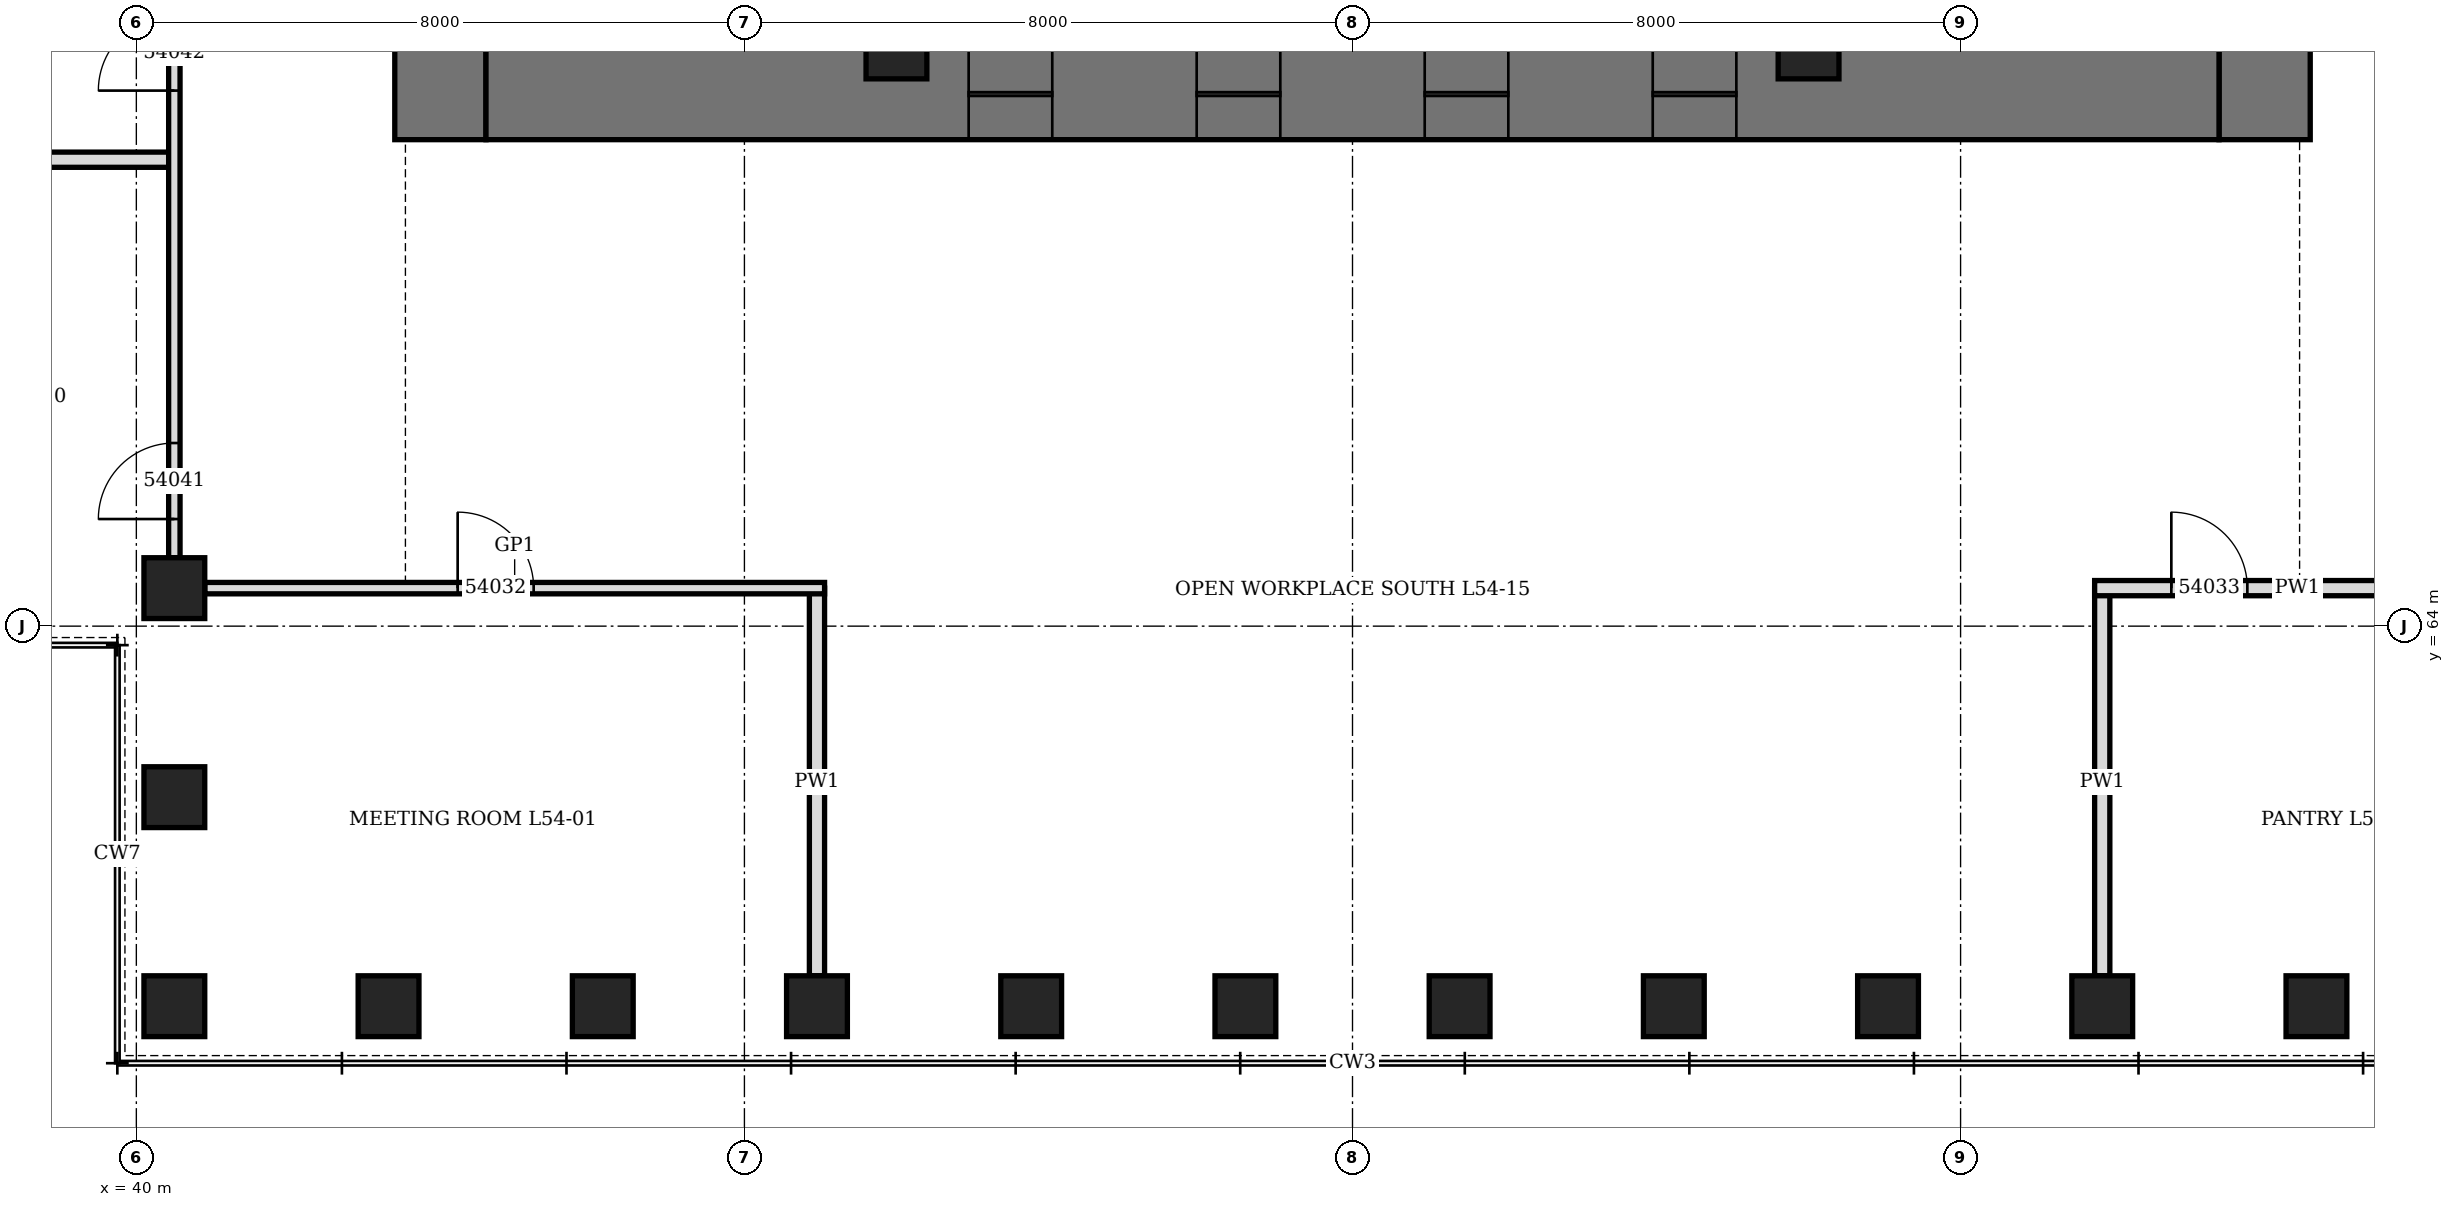
"""IFC4 building model, lengths in metres.
Left out: names, types, materials, properties, quantities, classifications, styles, units other than length and angle.
Written with IfcOpenShell. Run it as: python <this file> out.ifc"""

import sys

from ifc_helpers import new_model, si_unit, direction, frame, frame_2d, origin, origin_2d, place, context, subcontext, project, spatial, rectangle, hollow_rectangle, extrude, element, fill, save


model = new_model("IFC4")
c1 = context("Model", 3, precision=1e-05, world=origin(), true_north=direction((0.0, 1.0)))
c2 = subcontext(c1, "Body", "Model", "MODEL_VIEW")
j1 = project(units=[si_unit("LENGTHUNIT", "METRE"), si_unit("PLANEANGLEUNIT", "RADIAN")], contexts=[c1])
p1 = place(None, origin())
s1 = spatial("IfcSite", under=j1, at=p1, CompositionType="ELEMENT")
p2 = place(p1, origin())
s2 = spatial("IfcBuilding", under=s1, at=p2, CompositionType="ELEMENT")
p3 = place(p2, frame((0.0, 0.0, 240.1)))
s3 = spatial("IfcBuildingStorey", under=s2, at=p3, CompositionType="ELEMENT", Elevation=240.1)
for number, where, z_axis, x_axis in (
    (1, (40.5, 59.0, 0.0), (0.0, 0.0, 1.0), (1.0, 0.0, 0.0)),
    (2, (43.318, 59.0, 0.0), (0.0, 0.0, 1.0), (1.0, 0.0, 0.0)),
    (3, (46.136, 59.0, 0.0), (0.0, 0.0, 1.0), (1.0, 0.0, 0.0)),
    (4, (48.955, 59.0, 0.0), (0.0, 0.0, 1.0), (1.0, 0.0, 0.0)),
    (5, (51.773, 59.0, 0.0), (0.0, 0.0, 1.0), (1.0, 0.0, 0.0)),
    (6, (54.591, 59.0, 0.0), (0.0, 0.0, 1.0), (1.0, 0.0, 0.0)),
    (7, (57.409, 59.0, 0.0), (0.0, 0.0, 1.0), (1.0, 0.0, 0.0)),
    (8, (60.227, 59.0, 0.0), (0.0, 0.0, 1.0), (1.0, 0.0, 0.0)),
    (9, (63.045, 59.0, 0.0), (0.0, 0.0, 1.0), (1.0, 0.0, 0.0)),
    (10, (65.864, 59.0, 0.0), (0.0, 0.0, 1.0), (1.0, 0.0, 0.0)),
    (11, (68.682, 59.0, 0.0), (0.0, 0.0, 1.0), (1.0, 0.0, 0.0)),
    (12, (40.5, 64.5, 0.0), (0.0, 0.0, 1.0), (0.0, 1.0, 0.0)),
    (13, (40.5, 61.75, 0.0), (0.0, 0.0, 1.0), (0.0, 1.0, 0.0)),
):
    element("IfcColumn", number, at=place(p3, frame(where, z_axis=z_axis, x_axis=x_axis)), inside=s3, PredefinedType="COLUMN", context=c2, shape_type="SweptSolid", body=[
        extrude(hollow_rectangle(XDim=0.8, YDim=0.8, WallThickness=0.08, at=origin_2d()), origin(), (0.0, 0.0, 1.0), 4.2),
    ])
p4 = place(p3, frame((44.0, 70.4, 0.0), z_axis=(0.0, 0.0, 1.0), x_axis=(0.0, 1.0, 0.0)))
e14 = element("IfcWall", 14, at=p4, inside=s3, PredefinedType="SHEAR", context=c2, shape_type="SweptSolid", body=[
    extrude(rectangle(XDim=19.2, YDim=1.2, at=frame_2d((9.6, 0.0))), origin(), (0.0, 0.0, 1.0), 4.2),
])
p5 = place(p4, frame((8.6, 0.0, 0.0)))
e15 = element("IfcOpeningElement", 15, at=p5, cuts=e14, PredefinedType="OPENING", context=c2, shape_type="SweptSolid", body=[
    extrude(rectangle(XDim=2.0, YDim=2.4, at=frame_2d((1.0, 1.2))), frame((0.0, 0.61, 0.0), z_axis=(0.0, -1.0, 0.0), x_axis=(1.0, 0.0, 0.0)), (0.0, 0.0, 1.0), 1.22),
])
p6 = place(p3, frame((68.0, 70.4, 0.0), z_axis=(0.0, 0.0, 1.0), x_axis=(0.0, 1.0, 0.0)))
e16 = element("IfcWall", 16, at=p6, inside=s3, PredefinedType="SHEAR", context=c2, shape_type="SweptSolid", body=[
    extrude(rectangle(XDim=19.2, YDim=1.2, at=frame_2d((9.6, 0.0))), origin(), (0.0, 0.0, 1.0), 4.2),
])
p7 = place(p6, frame((8.6, 0.0, 0.0)))
e17 = element("IfcOpeningElement", 17, at=p7, cuts=e16, PredefinedType="OPENING", context=c2, shape_type="SweptSolid", body=[
    extrude(rectangle(XDim=2.0, YDim=2.4, at=frame_2d((1.0, 1.2))), frame((0.0, 0.61, 0.0), z_axis=(0.0, -1.0, 0.0), x_axis=(1.0, 0.0, 0.0)), (0.0, 0.0, 1.0), 1.22),
])
p8 = place(p3, frame((44.6, 71.0, 0.0), z_axis=(0.0, 0.0, 1.0), x_axis=(1.0, 0.0, 0.0)))
e18 = element("IfcWall", 18, at=p8, inside=s3, PredefinedType="SHEAR", context=c2, shape_type="SweptSolid", body=[
    extrude(rectangle(XDim=22.8, YDim=1.2, at=frame_2d((11.4, 0.0))), origin(), (0.0, 0.0, 1.0), 4.2),
])
p9 = place(p8, frame((6.35, 0.0, 0.0)))
e19 = element("IfcOpeningElement", 19, at=p9, cuts=e18, PredefinedType="OPENING", context=c2, shape_type="SweptSolid", body=[
    extrude(rectangle(XDim=1.1, YDim=2.2, at=frame_2d((0.55, 1.1))), frame((0.0, 0.61, 0.0), z_axis=(0.0, -1.0, 0.0), x_axis=(1.0, 0.0, 0.0)), (0.0, 0.0, 1.0), 1.22),
])
p10 = place(p8, frame((9.35, 0.0, 0.0)))
e20 = element("IfcOpeningElement", 20, at=p10, cuts=e18, PredefinedType="OPENING", context=c2, shape_type="SweptSolid", body=[
    extrude(rectangle(XDim=1.1, YDim=2.2, at=frame_2d((0.55, 1.1))), frame((0.0, 0.61, 0.0), z_axis=(0.0, -1.0, 0.0), x_axis=(1.0, 0.0, 0.0)), (0.0, 0.0, 1.0), 1.22),
])
p11 = place(p8, frame((12.35, 0.0, 0.0)))
e21 = element("IfcOpeningElement", 21, at=p11, cuts=e18, PredefinedType="OPENING", context=c2, shape_type="SweptSolid", body=[
    extrude(rectangle(XDim=1.1, YDim=2.2, at=frame_2d((0.55, 1.1))), frame((0.0, 0.61, 0.0), z_axis=(0.0, -1.0, 0.0), x_axis=(1.0, 0.0, 0.0)), (0.0, 0.0, 1.0), 1.22),
])
p12 = place(p8, frame((15.35, 0.0, 0.0)))
e22 = element("IfcOpeningElement", 22, at=p12, cuts=e18, PredefinedType="OPENING", context=c2, shape_type="SweptSolid", body=[
    extrude(rectangle(XDim=1.1, YDim=2.2, at=frame_2d((0.55, 1.1))), frame((0.0, 0.61, 0.0), z_axis=(0.0, -1.0, 0.0), x_axis=(1.0, 0.0, 0.0)), (0.0, 0.0, 1.0), 1.22),
])
for number, where, z_axis, x_axis in (
    (23, (50.0, 71.6, 0.0), (0.0, 0.0, 1.0), (1.0, 0.0, 0.0)),
    (24, (62.0, 71.6, 0.0), (0.0, 0.0, 1.0), (1.0, 0.0, 0.0)),
):
    element("IfcColumn", number, at=place(p3, frame(where, z_axis=z_axis, x_axis=x_axis)), inside=s3, PredefinedType="COLUMN", context=c2, shape_type="SweptSolid", body=[
        extrude(hollow_rectangle(XDim=0.8, YDim=0.8, WallThickness=0.1, at=origin_2d()), origin(), (0.0, 0.0, 1.0), 4.2),
    ])
for number, where, z_axis, x_axis in (
    (25, (48.955, 59.4, 0.0), (0.0, 0.0, 1.0), (0.0, 1.0, 0.0)),
    (26, (65.864, 59.4, 0.0), (0.0, 0.0, 1.0), (0.0, 1.0, 0.0)),
    (27, (35.4, 70.136, 0.0), (0.0, 0.0, 1.0), (1.0, 0.0, 0.0)),
):
    element("IfcWall", number, at=place(p3, frame(where, z_axis=z_axis, x_axis=x_axis)), inside=s3, PredefinedType="PARTITIONING", context=c2, shape_type="SweptSolid", body=[
        extrude(rectangle(XDim=5.1, YDim=0.2, at=frame_2d((2.55, 0.0))), origin(), (0.0, 0.0, 1.0), 3.188),
    ])
p13 = place(p3, frame((40.9, 64.5, 0.0), z_axis=(0.0, 0.0, 1.0), x_axis=(1.0, 0.0, 0.0)))
e28 = element("IfcWall", 28, at=p13, inside=s3, PredefinedType="PARTITIONING", context=c2, shape_type="SweptSolid", body=[
    extrude(rectangle(XDim=8.155, YDim=0.15, at=frame_2d((4.077, 0.0))), origin(), (0.0, 0.0, 1.0), 3.95),
])
p14 = place(p13, frame((3.327, 0.0, 0.0)))
e29 = element("IfcOpeningElement", 29, at=p14, cuts=e28, PredefinedType="OPENING", context=c2, shape_type="SweptSolid", body=[
    extrude(rectangle(XDim=1.0, YDim=2.4, at=frame_2d((0.5, 1.2))), frame((0.0, 0.085, 0.0), z_axis=(0.0, -1.0, 0.0), x_axis=(1.0, 0.0, 0.0)), (0.0, 0.0, 1.0), 0.17),
])
p15 = place(p3, frame((65.764, 64.5, 0.0), z_axis=(0.0, 0.0, 1.0), x_axis=(1.0, 0.0, 0.0)))
e30 = element("IfcWall", 30, at=p15, inside=s3, PredefinedType="PARTITIONING", context=c2, shape_type="SweptSolid", body=[
    extrude(rectangle(XDim=5.336, YDim=0.2, at=frame_2d((2.668, 0.0))), origin(), (0.0, 0.0, 1.0), 3.95),
])
p16 = place(p15, frame((1.009, 0.0, 0.0)))
e31 = element("IfcOpeningElement", 31, at=p16, cuts=e30, PredefinedType="OPENING", context=c2, shape_type="SweptSolid", body=[
    extrude(rectangle(XDim=1.0, YDim=2.1, at=frame_2d((0.5, 1.05))), frame((0.0, 0.11, 0.0), z_axis=(0.0, -1.0, 0.0), x_axis=(1.0, 0.0, 0.0)), (0.0, 0.0, 1.0), 0.22),
])
p17 = place(p3, frame((40.5, 64.9, 0.0), z_axis=(0.0, 0.0, 1.0), x_axis=(0.0, 1.0, 0.0)))
e32 = element("IfcWall", 32, at=p17, inside=s3, PredefinedType="PARTITIONING", context=c2, shape_type="SweptSolid", body=[
    extrude(rectangle(XDim=16.609, YDim=0.15, at=frame_2d((8.305, 0.0))), origin(), (0.0, 0.0, 1.0), 3.95),
])
p18 = place(p17, frame((0.509, 0.0, 0.0)))
e33 = element("IfcOpeningElement", 33, at=p18, cuts=e32, PredefinedType="OPENING", context=c2, shape_type="SweptSolid", body=[
    extrude(rectangle(XDim=1.0, YDim=2.4, at=frame_2d((0.5, 1.2))), frame((0.0, 0.085, 0.0), z_axis=(0.0, -1.0, 0.0), x_axis=(1.0, 0.0, 0.0)), (0.0, 0.0, 1.0), 0.17),
])
p19 = place(p17, frame((6.146, 0.0, 0.0)))
e34 = element("IfcOpeningElement", 34, at=p19, cuts=e32, PredefinedType="OPENING", context=c2, shape_type="SweptSolid", body=[
    extrude(rectangle(XDim=1.0, YDim=2.1, at=frame_2d((0.5, 1.05))), frame((0.0, 0.085, 0.0), z_axis=(0.0, -1.0, 0.0), x_axis=(1.0, 0.0, 0.0)), (0.0, 0.0, 1.0), 0.17),
])
p20 = place(p17, frame((11.782, 0.0, 0.0)))
e35 = element("IfcOpeningElement", 35, at=p20, cuts=e32, PredefinedType="OPENING", context=c2, shape_type="SweptSolid", body=[
    extrude(rectangle(XDim=1.0, YDim=2.1, at=frame_2d((0.5, 1.05))), frame((0.0, 0.085, 0.0), z_axis=(0.0, -1.0, 0.0), x_axis=(1.0, 0.0, 0.0)), (0.0, 0.0, 1.0), 0.17),
])
p21 = place(p9, origin())
e36 = element("IfcDoor", 36, at=p21, inside=s3, OperationType="SLIDING_TO_LEFT", PredefinedType="DOOR", context=c2, shape_type="SweptSolid", body=[
    extrude(rectangle(XDim=1.1, YDim=2.2, at=frame_2d((0.55, 1.1))), frame((0.0, 0.35, 0.0), z_axis=(0.0, -1.0, 0.0), x_axis=(1.0, 0.0, 0.0)), (0.0, 0.0, 1.0), 0.7),
])
fill(e19, e36)
p22 = place(p10, origin())
e37 = element("IfcDoor", 37, at=p22, inside=s3, OperationType="SLIDING_TO_LEFT", PredefinedType="DOOR", context=c2, shape_type="SweptSolid", body=[
    extrude(rectangle(XDim=1.1, YDim=2.2, at=frame_2d((0.55, 1.1))), frame((0.0, 0.35, 0.0), z_axis=(0.0, -1.0, 0.0), x_axis=(1.0, 0.0, 0.0)), (0.0, 0.0, 1.0), 0.7),
])
fill(e20, e37)
p23 = place(p11, origin())
e38 = element("IfcDoor", 38, at=p23, inside=s3, OperationType="SLIDING_TO_LEFT", PredefinedType="DOOR", context=c2, shape_type="SweptSolid", body=[
    extrude(rectangle(XDim=1.1, YDim=2.2, at=frame_2d((0.55, 1.1))), frame((0.0, 0.35, 0.0), z_axis=(0.0, -1.0, 0.0), x_axis=(1.0, 0.0, 0.0)), (0.0, 0.0, 1.0), 0.7),
])
fill(e21, e38)
p24 = place(p12, origin())
e39 = element("IfcDoor", 39, at=p24, inside=s3, OperationType="SLIDING_TO_LEFT", PredefinedType="DOOR", context=c2, shape_type="SweptSolid", body=[
    extrude(rectangle(XDim=1.1, YDim=2.2, at=frame_2d((0.55, 1.1))), frame((0.0, 0.35, 0.0), z_axis=(0.0, -1.0, 0.0), x_axis=(1.0, 0.0, 0.0)), (0.0, 0.0, 1.0), 0.7),
])
fill(e22, e39)
p25 = place(p14, origin())
e40 = element("IfcDoor", 40, at=p25, inside=s3, OperationType="SINGLE_SWING_RIGHT", PredefinedType="DOOR", context=c2, shape_type="SweptSolid", body=[
    extrude(rectangle(XDim=1.0, YDim=2.4, at=frame_2d((0.5, 1.2))), frame((0.0, 0.075, 0.0), z_axis=(0.0, -1.0, 0.0), x_axis=(1.0, 0.0, 0.0)), (0.0, 0.0, 1.0), 0.149),
])
fill(e29, e40)
p26 = place(p16, origin())
e41 = element("IfcDoor", 41, at=p26, inside=s3, OperationType="SINGLE_SWING_LEFT", PredefinedType="DOOR", context=c2, shape_type="SweptSolid", body=[
    extrude(rectangle(XDim=1.0, YDim=2.1, at=frame_2d((0.5, 1.05))), frame((0.0, 0.1, 0.0), z_axis=(0.0, -1.0, 0.0), x_axis=(1.0, 0.0, 0.0)), (0.0, 0.0, 1.0), 0.199),
])
fill(e31, e41)
p27 = place(p18, origin())
e42 = element("IfcDoor", 42, at=p27, inside=s3, OperationType="SINGLE_SWING_RIGHT", PredefinedType="DOOR", context=c2, shape_type="SweptSolid", body=[
    extrude(rectangle(XDim=1.0, YDim=2.4, at=frame_2d((0.5, 1.2))), frame((0.0, 0.075, 0.0), z_axis=(0.0, -1.0, 0.0), x_axis=(1.0, 0.0, 0.0)), (0.0, 0.0, 1.0), 0.149),
])
fill(e33, e42)
p28 = place(p19, origin())
e43 = element("IfcDoor", 43, at=p28, inside=s3, OperationType="SINGLE_SWING_LEFT", PredefinedType="DOOR", context=c2, shape_type="SweptSolid", body=[
    extrude(rectangle(XDim=1.0, YDim=2.1, at=frame_2d((0.5, 1.05))), frame((0.0, 0.075, 0.0), z_axis=(0.0, -1.0, 0.0), x_axis=(1.0, 0.0, 0.0)), (0.0, 0.0, 1.0), 0.149),
])
fill(e34, e43)
save(model, sys.argv[1])
